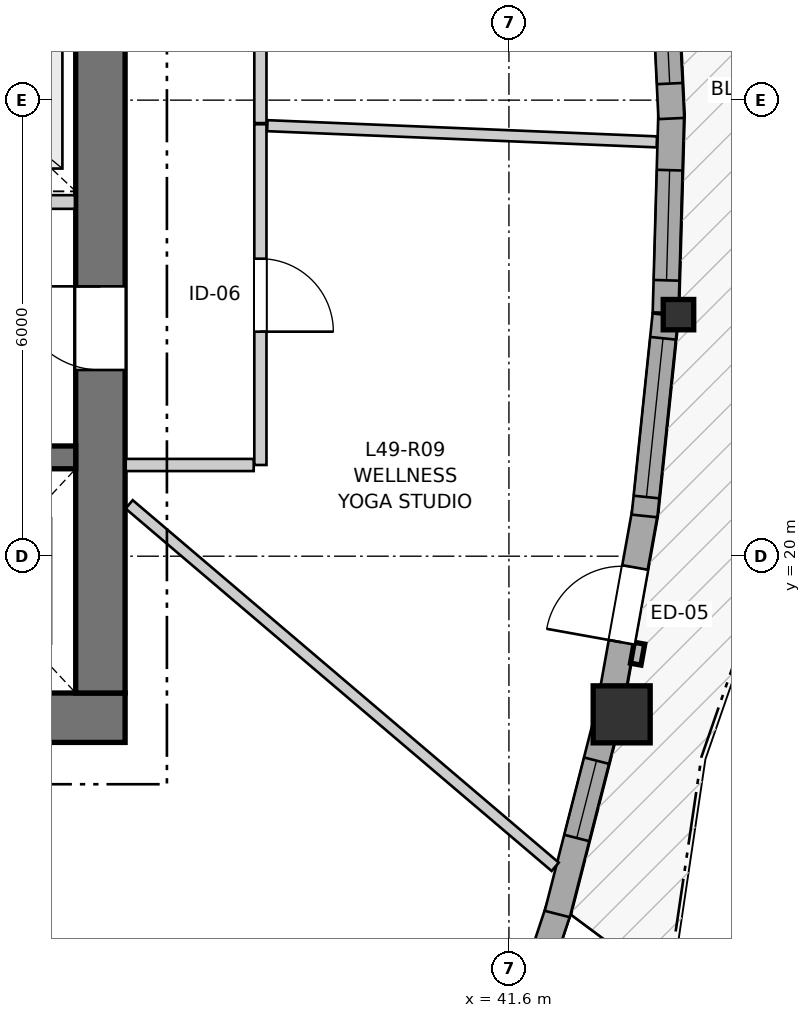
"""IFC4 building model, lengths in metres.
Left out: names, types, materials, properties, quantities, classifications, styles, units other than length and angle.
Written with IfcOpenShell. Run it as: python <this file> out.ifc"""

import sys

from ifc_helpers import new_model, si_unit, direction, frame, frame_2d, origin, origin_2d, place, context, subcontext, project, spatial, rectangle, i_section, extrude, source, transform, mapped, element, fill, save


model = new_model("IFC4")
c1 = context("Model", 3, precision=1e-05, world=origin(), true_north=direction((0.0, 1.0)))
c2 = subcontext(c1, "Body", "Model", "MODEL_VIEW")
j1 = project(units=[si_unit("LENGTHUNIT", "METRE"), si_unit("PLANEANGLEUNIT", "RADIAN")], contexts=[c1])
p1 = place(None, origin())
s1 = spatial("IfcSite", under=j1, at=p1, CompositionType="ELEMENT")
p2 = place(p1, origin())
s2 = spatial("IfcBuilding", under=s1, at=p2, CompositionType="ELEMENT")
p3 = place(p2, frame((0.0, 0.0, 165.0)))
s3 = spatial("IfcBuildingStorey", under=s2, at=p3, CompositionType="ELEMENT", Elevation=165.0)
p4 = place(p3, frame((24.15, 17.875, 0.0), z_axis=(0.0, 0.0, 1.0), x_axis=(1.0, 0.0, 0.0)))
e1 = element("IfcWall", 1, at=p4, inside=s3, PredefinedType="SHEAR", context=c2, shape_type="SweptSolid", body=[
    extrude(rectangle(XDim=12.4, YDim=0.65, at=frame_2d((6.2, 0.0))), origin(), (0.0, 0.0, 1.0), 2.95),
])
p5 = place(p3, frame((36.225, 18.2, 0.0), z_axis=(0.0, 0.0, 1.0), x_axis=(0.0, 1.0, 0.0)))
e2 = element("IfcWall", 2, at=p5, inside=s3, PredefinedType="SHEAR", context=c2, shape_type="SweptSolid", body=[
    extrude(rectangle(XDim=15.6, YDim=0.65, at=frame_2d((7.8, 0.0))), origin(), (0.0, 0.0, 1.0), 2.95),
])
p6 = place(p5, frame((4.25, 0.0, 0.0)))
e3 = element("IfcOpeningElement", 3, at=p6, cuts=e2, PredefinedType="OPENING", context=c2, shape_type="SweptSolid", body=[
    extrude(rectangle(XDim=1.1, YDim=2.15, at=frame_2d((0.55, 1.075))), frame((0.0, 0.335, 0.0), z_axis=(0.0, -1.0, 0.0), x_axis=(1.0, 0.0, 0.0)), (0.0, 0.0, 1.0), 0.67),
])
p7 = place(p5, frame((10.25, 0.0, 0.0)))
e4 = element("IfcOpeningElement", 4, at=p7, cuts=e2, PredefinedType="OPENING", context=c2, shape_type="SweptSolid", body=[
    extrude(rectangle(XDim=1.1, YDim=2.15, at=frame_2d((0.55, 1.075))), frame((0.0, 0.335, 0.0), z_axis=(0.0, -1.0, 0.0), x_axis=(1.0, 0.0, 0.0)), (0.0, 0.0, 1.0), 0.67),
])
p8 = place(p3, frame((24.8, 21.3, 0.0), z_axis=(0.0, 0.0, 1.0), x_axis=(1.0, 0.0, 0.0)))
e5 = element("IfcWall", 5, at=p8, inside=s3, PredefinedType="SHEAR", context=c2, shape_type="SweptSolid", body=[
    extrude(rectangle(XDim=11.1, YDim=0.3, at=frame_2d((5.55, 0.0))), origin(), (0.0, 0.0, 1.0), 2.95),
])
p9 = place(p8, frame((6.22, 0.0, 0.0)))
e6 = element("IfcOpeningElement", 6, at=p9, cuts=e5, PredefinedType="OPENING", context=c2, shape_type="SweptSolid", body=[
    extrude(rectangle(XDim=0.98, YDim=2.15, at=frame_2d((0.49, 1.075))), frame((0.0, 0.16, 0.0), z_axis=(0.0, -1.0, 0.0), x_axis=(1.0, 0.0, 0.0)), (0.0, 0.0, 1.0), 0.32),
])
p10 = place(p8, frame((9.15, 0.0, 0.0)))
e7 = element("IfcOpeningElement", 7, at=p10, cuts=e5, PredefinedType="OPENING", context=c2, shape_type="SweptSolid", body=[
    extrude(rectangle(XDim=1.15, YDim=2.15, at=frame_2d((0.575, 1.075))), frame((0.0, 0.16, 0.0), z_axis=(0.0, -1.0, 0.0), x_axis=(1.0, 0.0, 0.0)), (0.0, 0.0, 1.0), 0.32),
])
m1 = source(origin(), c2, "Body", "SweptSolid", [
    extrude(rectangle(XDim=0.75, YDim=0.75, at=origin_2d()), origin(), (0.0, 0.0, 1.0), 2.95),
])
p11 = place(p3, frame((43.083, 17.919, 0.0), z_axis=(0.0, 0.0, 1.0), x_axis=(1.0, 0.0, 0.0)))
e8 = element("IfcColumn", 8, at=p11, inside=s3, PredefinedType="COLUMN", context=c2, shape_type="MappedRepresentation", body=[
    mapped(m1, transform((0.0, 0.0, 0.0), x_axis=(1.0, 0.0, 0.0), y_axis=(0.0, 1.0, 0.0), z_axis=(0.0, 0.0, 1.0), scale=1.0)),
])
m2 = source(origin(), c2, "Body", "SweptSolid", [
    extrude(i_section(OverallWidth=0.401, OverallDepth=0.399, WebThickness=0.023, FlangeThickness=0.036, FilletRadius=0.015, at=origin_2d()), origin(), (0.0, 0.0, 1.0), 2.95),
])
p12 = place(p3, frame((43.831, 23.178, 0.0), z_axis=(0.0, 0.0, 1.0), x_axis=(1.0, 0.0, 0.0)))
e9 = element("IfcColumn", 9, at=p12, inside=s3, PredefinedType="PILASTER", context=c2, shape_type="MappedRepresentation", body=[
    mapped(m2, transform((0.0, 0.0, 0.0), x_axis=(1.0, 0.0, 0.0), y_axis=(0.0, 1.0, 0.0), z_axis=(0.0, 0.0, 1.0), scale=1.0)),
])
p13 = place(p3, frame((41.383, 12.726, 0.0), z_axis=(0.0, 0.0, 1.0), x_axis=(0.314443872574, 0.949276066801, 0.0)))
e10 = element("IfcWall", 10, at=p13, inside=s3, PredefinedType="SOLIDWALL", context=c2, shape_type="SweptSolid", body=[
    extrude(rectangle(XDim=2.793, YDim=0.34, at=frame_2d((1.396, 0.0))), origin(), (0.0, 0.0, 1.0), 2.53),
])
p14 = place(p13, frame((0.711, 0.0, 0.82)))
e11 = element("IfcOpeningElement", 11, at=p14, cuts=e10, PredefinedType="OPENING", context=c2, shape_type="SweptSolid", body=[
    extrude(rectangle(XDim=1.35, YDim=1.45, at=frame_2d((0.675, 0.725))), frame((0.0, 0.18, 0.0), z_axis=(0.0, -1.0, 0.0), x_axis=(1.0, 0.0, 0.0)), (0.0, 0.0, 1.0), 0.36),
])
p15 = place(p3, frame((42.236, 15.292, 0.0), z_axis=(0.0, 0.0, 1.0), x_axis=(0.24772461275, 0.968830488908, 0.0)))
e12 = element("IfcWall", 12, at=p15, inside=s3, PredefinedType="SOLIDWALL", context=c2, shape_type="SweptSolid", body=[
    extrude(rectangle(XDim=2.6, YDim=0.34, at=frame_2d((1.3, 0.0))), origin(), (0.0, 0.0, 1.0), 2.53),
])
p16 = place(p15, frame((1.033, 0.0, 0.82)))
e13 = element("IfcOpeningElement", 13, at=p16, cuts=e12, PredefinedType="OPENING", context=c2, shape_type="SweptSolid", body=[
    extrude(rectangle(XDim=1.05, YDim=1.45, at=frame_2d((0.525, 0.725))), frame((0.0, 0.18, 0.0), z_axis=(0.0, -1.0, 0.0), x_axis=(1.0, 0.0, 0.0)), (0.0, 0.0, 1.0), 0.36),
])
p17 = place(p3, frame((42.944, 18.102, 0.0), z_axis=(0.0, 0.0, 1.0), x_axis=(0.177119685378, 0.98418931972, 0.0)))
e14 = element("IfcWall", 14, at=p17, inside=s3, PredefinedType="SOLIDWALL", context=c2, shape_type="SweptSolid", body=[
    extrude(rectangle(XDim=2.555, YDim=0.34, at=frame_2d((1.278, 0.0))), origin(), (0.0, 0.0, 1.0), 2.53),
])
p18 = place(p17, frame((0.778, 0.0, 0.0)))
e15 = element("IfcOpeningElement", 15, at=p18, cuts=e14, PredefinedType="OPENING", context=c2, shape_type="SweptSolid", body=[
    extrude(rectangle(XDim=1.0, YDim=2.1, at=frame_2d((0.5, 1.05))), frame((0.0, 0.18, 0.0), z_axis=(0.0, -1.0, 0.0), x_axis=(1.0, 0.0, 0.0)), (0.0, 0.0, 1.0), 0.36),
])
p19 = place(p3, frame((43.384, 20.53, 0.0), z_axis=(0.0, 0.0, 1.0), x_axis=(0.103600410634, 0.994618999877, 0.0)))
e16 = element("IfcWall", 16, at=p19, inside=s3, PredefinedType="SOLIDWALL", context=c2, shape_type="SweptSolid", body=[
    extrude(rectangle(XDim=2.661, YDim=0.34, at=frame_2d((1.33, 0.0))), origin(), (0.0, 0.0, 1.0), 2.53),
])
p20 = place(p19, frame((0.25, 0.0, 0.82)))
e17 = element("IfcOpeningElement", 17, at=p20, cuts=e16, PredefinedType="OPENING", context=c2, shape_type="SweptSolid", body=[
    extrude(rectangle(XDim=2.1, YDim=1.4, at=frame_2d((1.05, 0.7))), frame((0.0, 0.18, 0.0), z_axis=(0.0, -1.0, 0.0), x_axis=(1.0, 0.0, 0.0)), (0.0, 0.0, 1.0), 0.36),
])
p21 = place(p3, frame((43.661, 23.203, 0.0), z_axis=(0.0, 0.0, 1.0), x_axis=(0.028240970376, 0.999601144253, 0.0)))
e18 = element("IfcWall", 18, at=p21, inside=s3, PredefinedType="SOLIDWALL", context=c2, shape_type="SweptSolid", body=[
    extrude(rectangle(XDim=2.645, YDim=0.34, at=frame_2d((1.323, 0.0))), origin(), (0.0, 0.0, 1.0), 2.53),
])
p22 = place(p21, frame((0.427, 0.0, 0.82)))
e19 = element("IfcOpeningElement", 19, at=p22, cuts=e18, PredefinedType="OPENING", context=c2, shape_type="SweptSolid", body=[
    extrude(rectangle(XDim=1.45, YDim=1.25, at=frame_2d((0.725, 0.625))), frame((0.0, 0.18, 0.0), z_axis=(0.0, -1.0, 0.0), x_axis=(1.0, 0.0, 0.0)), (0.0, 0.0, 1.0), 0.36),
])
p23 = place(p3, frame((43.737, 25.758, 0.0), z_axis=(0.0, 0.0, 1.0), x_axis=(-0.047648310491, 0.998864174204, 0.0)))
e20 = element("IfcWall", 20, at=p23, inside=s3, PredefinedType="SOLIDWALL", context=c2, shape_type="SweptSolid", body=[
    extrude(rectangle(XDim=2.511, YDim=0.34, at=frame_2d((1.255, 0.0))), origin(), (0.0, 0.0, 1.0), 2.53),
])
p24 = place(p23, frame((0.46, 0.0, 0.82)))
e21 = element("IfcOpeningElement", 21, at=p24, cuts=e20, PredefinedType="OPENING", context=c2, shape_type="SweptSolid", body=[
    extrude(rectangle(XDim=1.6, YDim=1.35, at=frame_2d((0.8, 0.675))), frame((0.0, 0.18, 0.0), z_axis=(0.0, -1.0, 0.0), x_axis=(1.0, 0.0, 0.0)), (0.0, 0.0, 1.0), 0.36),
])
p25 = place(p3, frame((30.67, 24.66, 0.0), z_axis=(0.0, 0.0, 1.0), x_axis=(1.0, 0.0, 0.0)))
e22 = element("IfcWall", 22, at=p25, inside=s3, PredefinedType="PARTITIONING", context=c2, shape_type="SweptSolid", body=[
    extrude(rectangle(XDim=5.22, YDim=0.18, at=frame_2d((2.61, 0.0))), origin(), (0.0, 0.0, 1.0), 2.95),
])
p26 = place(p25, frame((0.68, 0.0, 0.0)))
e23 = element("IfcOpeningElement", 23, at=p26, cuts=e22, PredefinedType="OPENING", context=c2, shape_type="SweptSolid", body=[
    extrude(rectangle(XDim=0.98, YDim=2.15, at=frame_2d((0.49, 1.075))), frame((0.0, 0.1, 0.0), z_axis=(0.0, -1.0, 0.0), x_axis=(1.0, 0.0, 0.0)), (0.0, 0.0, 1.0), 0.2),
])
p27 = place(p3, frame((38.33, 25.683, 0.0), z_axis=(0.0, 0.0, 1.0), x_axis=(0.0, -1.0, 0.0)))
e24 = element("IfcWall", 24, at=p27, inside=s3, PredefinedType="PARTITIONING", context=c2, shape_type="SweptSolid", body=[
    extrude(rectangle(XDim=4.483, YDim=0.16, at=frame_2d((2.242, 0.0))), origin(), (0.0, 0.0, 1.0), 2.95),
])
p28 = place(p27, frame((1.769, 0.0, 0.0)))
e25 = element("IfcOpeningElement", 25, at=p28, cuts=e24, PredefinedType="OPENING", context=c2, shape_type="SweptSolid", body=[
    extrude(rectangle(XDim=0.96, YDim=2.1, at=frame_2d((0.48, 1.05))), frame((0.0, 0.09, 0.0), z_axis=(0.0, -1.0, 0.0), x_axis=(1.0, 0.0, 0.0)), (0.0, 0.0, 1.0), 0.18),
])
p29 = place(p3, frame((38.33, 29.019, 0.0), z_axis=(0.0, 0.0, 1.0), x_axis=(0.0, -1.0, 0.0)))
e26 = element("IfcWall", 26, at=p29, inside=s3, PredefinedType="PARTITIONING", context=c2, shape_type="SweptSolid", body=[
    extrude(rectangle(XDim=3.321, YDim=0.16, at=frame_2d((1.661, 0.0))), origin(), (0.0, 0.0, 1.0), 2.95),
])
p30 = place(p29, frame((1.01, 0.0, 0.0)))
e27 = element("IfcOpeningElement", 27, at=p30, cuts=e26, PredefinedType="OPENING", context=c2, shape_type="SweptSolid", body=[
    extrude(rectangle(XDim=1.3, YDim=2.1, at=frame_2d((0.65, 1.05))), frame((0.0, 0.09, 0.0), z_axis=(0.0, -1.0, 0.0), x_axis=(1.0, 0.0, 0.0)), (0.0, 0.0, 1.0), 0.18),
])
p31 = place(p3, frame((36.603, 20.682, 0.0), z_axis=(0.0, 0.0, 1.0), x_axis=(0.761710074833, -0.647918020971, 0.0)))
e28 = element("IfcWall", 28, at=p31, inside=s3, PredefinedType="PARTITIONING", context=c2, shape_type="SweptSolid", body=[
    extrude(rectangle(XDim=7.359, YDim=0.145, at=frame_2d((3.68, 0.0))), origin(), (0.0, 0.0, 1.0), 2.95),
])
p32 = place(p3, frame((38.421, 25.664, 0.0), z_axis=(0.0, 0.0, 1.0), x_axis=(0.999132413059, -0.041646382499, 0.0)))
e29 = element("IfcWall", 29, at=p32, inside=s3, PredefinedType="PARTITIONING", context=c2, shape_type="SweptSolid", body=[
    extrude(rectangle(XDim=5.129, YDim=0.145, at=frame_2d((2.565, 0.0))), origin(), (0.0, 0.0, 1.0), 2.95),
])
p33 = place(p3, frame((36.558, 21.2, 0.0), z_axis=(0.0, 0.0, 1.0), x_axis=(1.0, 0.0, 0.0)))
e30 = element("IfcWall", 30, at=p33, inside=s3, PredefinedType="PARTITIONING", context=c2, shape_type="SweptSolid", body=[
    extrude(rectangle(XDim=1.684, YDim=0.16, at=frame_2d((0.842, 0.0))), origin(), (0.0, 0.0, 1.0), 2.95),
])
m3 = source(origin(), c2, "Body", "SweptSolid", [
    extrude(rectangle(XDim=1.05, YDim=1.45, at=frame_2d((0.525, 0.725))), frame((0.0, 0.03, 0.0), z_axis=(0.0, -1.0, 0.0), x_axis=(1.0, 0.0, 0.0)), (0.0, 0.0, 1.0), 0.06),
])
p34 = place(p16, origin())
e31 = element("IfcWindow", 31, at=p34, inside=s3, PartitioningType="SINGLE_PANEL", PredefinedType="WINDOW", context=c2, shape_type="MappedRepresentation", body=[
    mapped(m3, transform((0.0, 0.0, 0.0), x_axis=(1.0, 0.0, 0.0), y_axis=(0.0, 1.0, 0.0), z_axis=(0.0, 0.0, 1.0), scale=1.0)),
])
fill(e13, e31)
m4 = source(origin(), c2, "Body", "SweptSolid", [
    extrude(rectangle(XDim=2.1, YDim=1.4, at=frame_2d((1.05, 0.7))), frame((0.0, 0.03, 0.0), z_axis=(0.0, -1.0, 0.0), x_axis=(1.0, 0.0, 0.0)), (0.0, 0.0, 1.0), 0.06),
])
p35 = place(p20, origin())
e32 = element("IfcWindow", 32, at=p35, inside=s3, PartitioningType="SINGLE_PANEL", PredefinedType="WINDOW", context=c2, shape_type="MappedRepresentation", body=[
    mapped(m4, transform((0.0, 0.0, 0.0), x_axis=(1.0, 0.0, 0.0), y_axis=(0.0, 1.0, 0.0), z_axis=(0.0, 0.0, 1.0), scale=1.0)),
])
fill(e17, e32)
m5 = source(origin(), c2, "Body", "SweptSolid", [
    extrude(rectangle(XDim=1.45, YDim=1.25, at=frame_2d((0.725, 0.625))), frame((0.0, 0.03, 0.0), z_axis=(0.0, -1.0, 0.0), x_axis=(1.0, 0.0, 0.0)), (0.0, 0.0, 1.0), 0.06),
])
p36 = place(p22, origin())
e33 = element("IfcWindow", 33, at=p36, inside=s3, PartitioningType="SINGLE_PANEL", PredefinedType="WINDOW", context=c2, shape_type="MappedRepresentation", body=[
    mapped(m5, transform((0.0, 0.0, 0.0), x_axis=(1.0, 0.0, 0.0), y_axis=(0.0, 1.0, 0.0), z_axis=(0.0, 0.0, 1.0), scale=1.0)),
])
fill(e19, e33)
m6 = source(origin(), c2, "Body", "SweptSolid", [
    extrude(rectangle(XDim=1.6, YDim=1.35, at=frame_2d((0.8, 0.675))), frame((0.0, 0.03, 0.0), z_axis=(0.0, -1.0, 0.0), x_axis=(1.0, 0.0, 0.0)), (0.0, 0.0, 1.0), 0.06),
])
p37 = place(p24, origin())
e34 = element("IfcWindow", 34, at=p37, inside=s3, PartitioningType="SINGLE_PANEL", PredefinedType="WINDOW", context=c2, shape_type="MappedRepresentation", body=[
    mapped(m6, transform((0.0, 0.0, 0.0), x_axis=(1.0, 0.0, 0.0), y_axis=(0.0, 1.0, 0.0), z_axis=(0.0, 0.0, 1.0), scale=1.0)),
])
fill(e21, e34)
m7 = source(origin(), c2, "Body", "SweptSolid", [
    extrude(rectangle(XDim=1.0, YDim=2.1, at=frame_2d((0.5, 1.05))), frame((0.0, 0.025, 0.0), z_axis=(0.0, -1.0, 0.0), x_axis=(1.0, 0.0, 0.0)), (0.0, 0.0, 1.0), 0.05),
])
p38 = place(p18, origin())
e35 = element("IfcDoor", 35, at=p38, inside=s3, OperationType="SINGLE_SWING_LEFT", PredefinedType="DOOR", context=c2, shape_type="MappedRepresentation", body=[
    mapped(m7, transform((0.0, 0.0, 0.0), x_axis=(1.0, 0.0, 0.0), y_axis=(0.0, 1.0, 0.0), z_axis=(0.0, 0.0, 1.0), scale=1.0)),
])
fill(e15, e35)
m8 = source(origin(), c2, "Body", "SweptSolid", [
    extrude(rectangle(XDim=1.1, YDim=2.15, at=frame_2d((0.55, 1.075))), frame((0.0, 0.025, 0.0), z_axis=(0.0, -1.0, 0.0), x_axis=(1.0, 0.0, 0.0)), (0.0, 0.0, 1.0), 0.05),
])
p39 = place(p6, origin())
e36 = element("IfcDoor", 36, at=p39, inside=s3, OperationType="SINGLE_SWING_RIGHT", PredefinedType="DOOR", context=c2, shape_type="MappedRepresentation", body=[
    mapped(m8, transform((0.0, 0.0, 0.0), x_axis=(1.0, 0.0, 0.0), y_axis=(0.0, 1.0, 0.0), z_axis=(0.0, 0.0, 1.0), scale=1.0)),
])
fill(e3, e36)
m9 = source(origin(), c2, "Body", "SweptSolid", [
    extrude(rectangle(XDim=0.96, YDim=2.1, at=frame_2d((0.48, 1.05))), frame((0.0, 0.025, 0.0), z_axis=(0.0, -1.0, 0.0), x_axis=(1.0, 0.0, 0.0)), (0.0, 0.0, 1.0), 0.05),
])
p40 = place(p28, origin())
e37 = element("IfcDoor", 37, at=p40, inside=s3, OperationType="SINGLE_SWING_RIGHT", PredefinedType="DOOR", context=c2, shape_type="MappedRepresentation", body=[
    mapped(m9, transform((0.0, 0.0, 0.0), x_axis=(1.0, 0.0, 0.0), y_axis=(0.0, 1.0, 0.0), z_axis=(0.0, 0.0, 1.0), scale=1.0)),
])
fill(e25, e37)
save(model, sys.argv[1])
